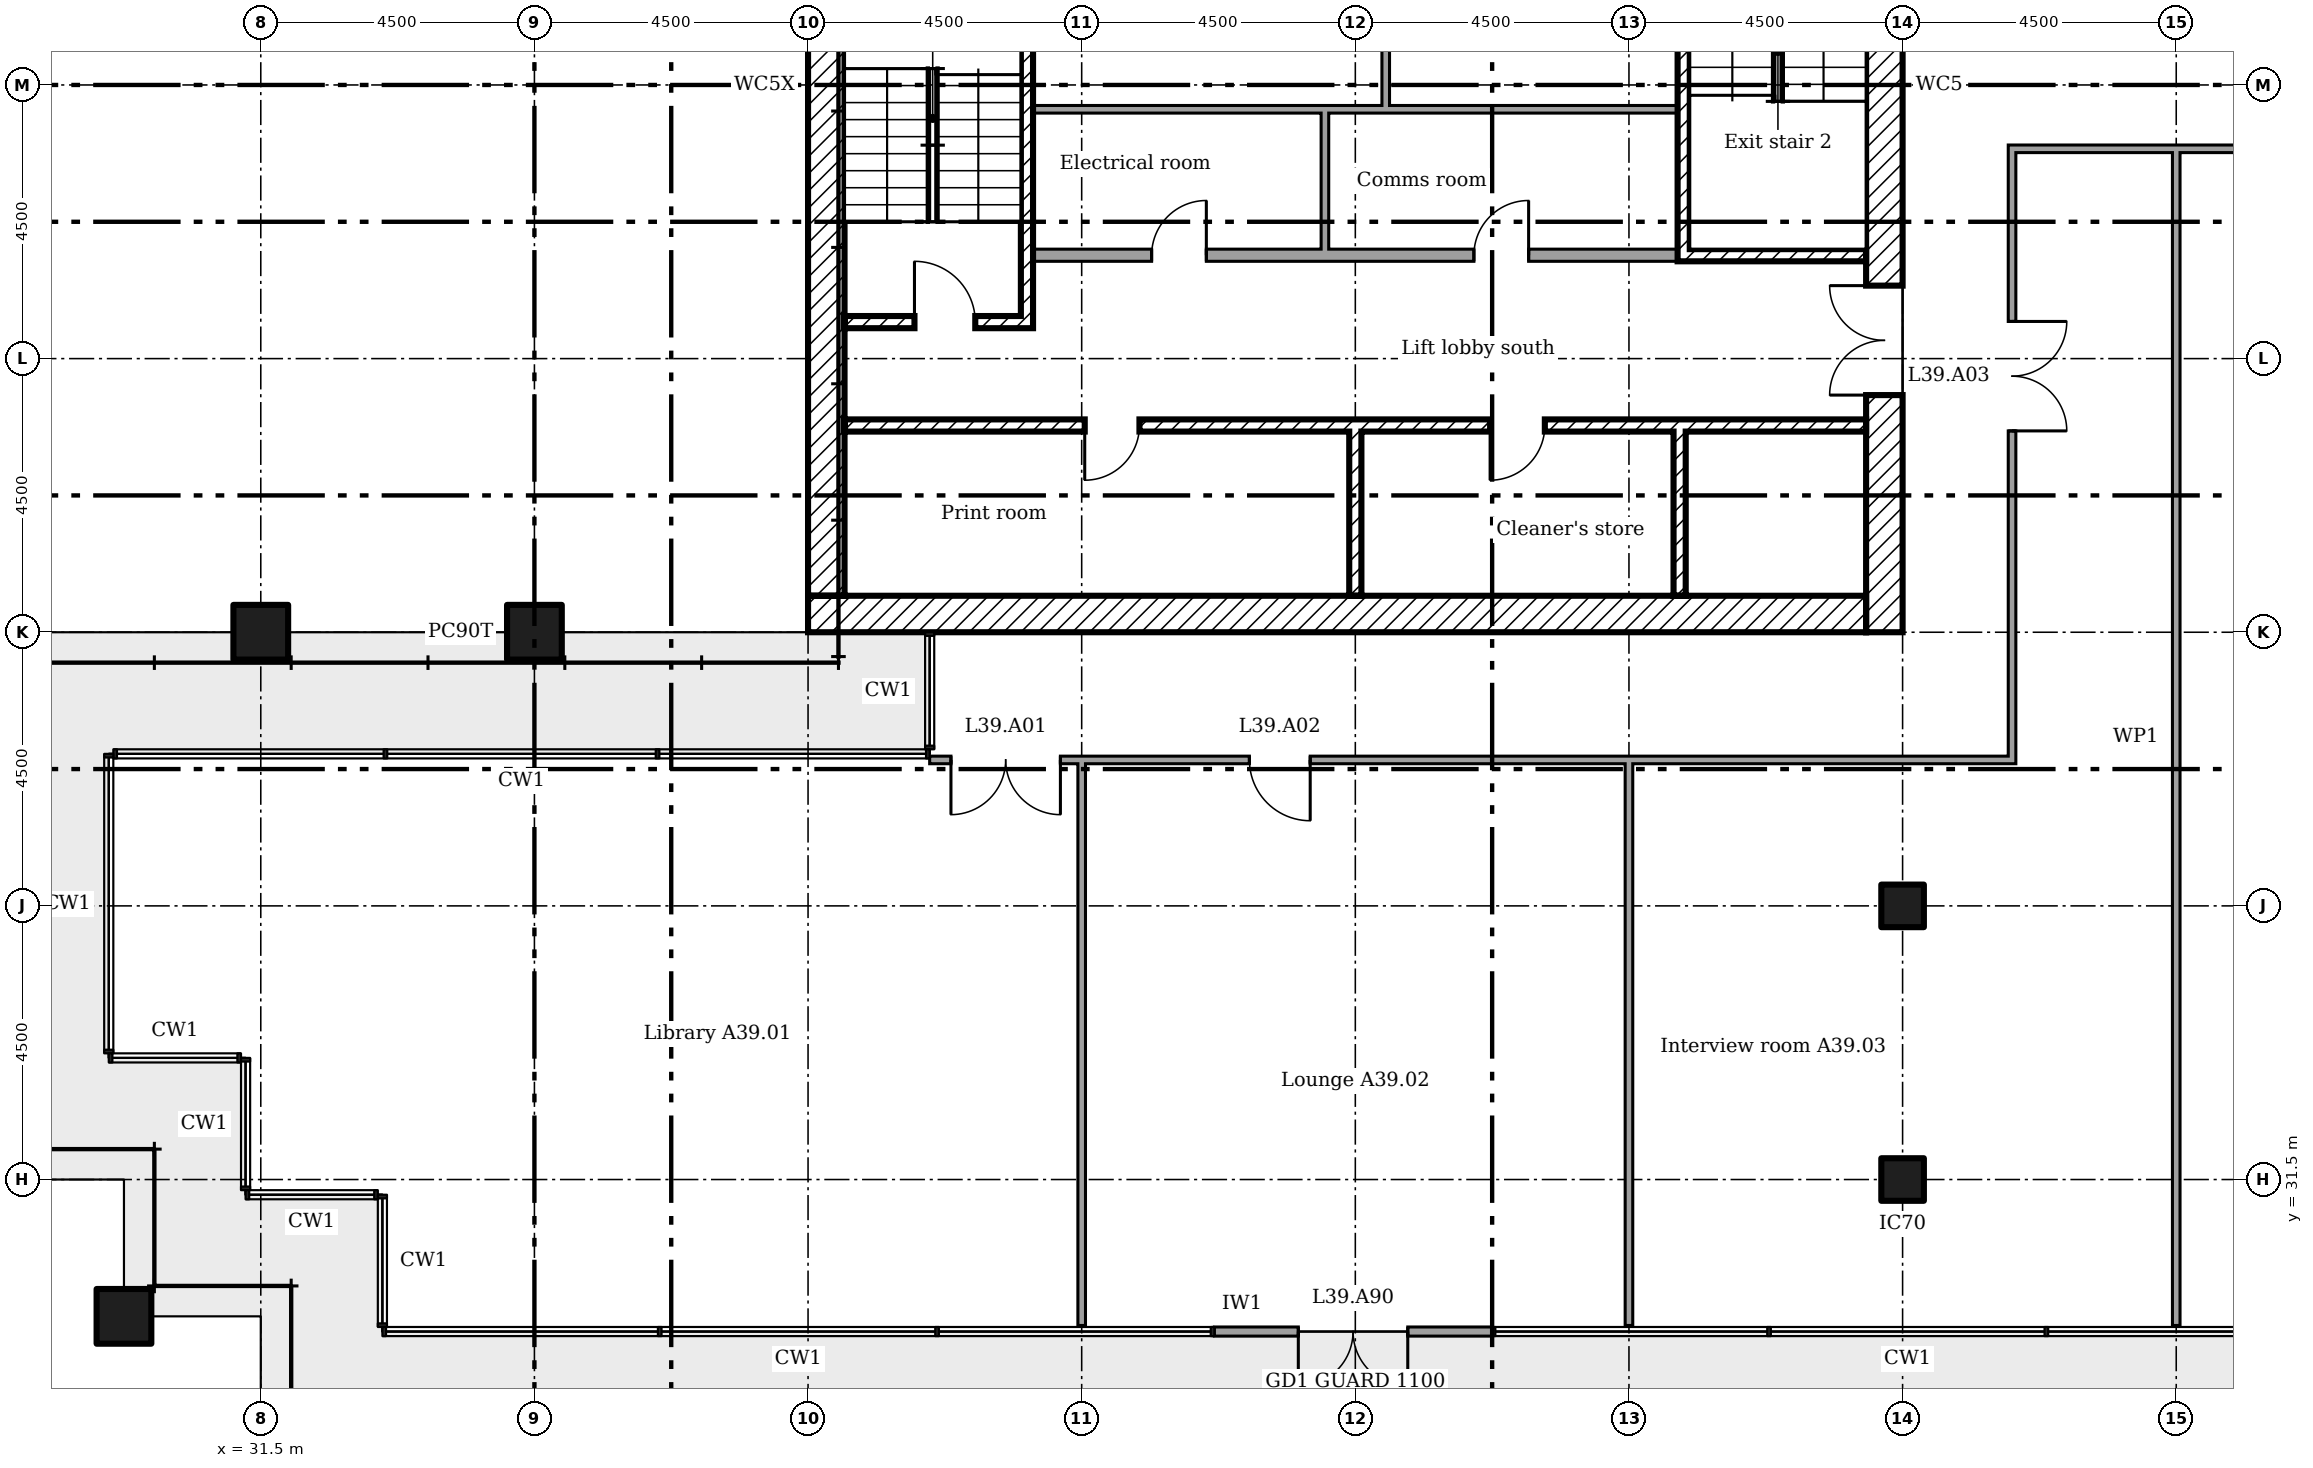
"""IFC4 building model, lengths in metres.
Left out: names, types, materials, properties, quantities, classifications, styles, units other than length and angle.
Written with IfcOpenShell. Run it as: python <this file> out.ifc"""

import sys

from ifc_helpers import new_model, si_unit, direction, frame, frame_2d, origin, origin_2d, place, context, subcontext, project, spatial, rectangle, extrude, element, fill, save


model = new_model("IFC4")
c1 = context("Model", 3, precision=1e-05, world=origin(), true_north=direction((0.0, 1.0)))
c2 = subcontext(c1, "Body", "Model", "MODEL_VIEW")
j1 = project(units=[si_unit("LENGTHUNIT", "METRE"), si_unit("PLANEANGLEUNIT", "RADIAN")], contexts=[c1])
p1 = place(None, origin())
s1 = spatial("IfcSite", under=j1, at=p1, CompositionType="ELEMENT")
p2 = place(p1, origin())
s2 = spatial("IfcBuilding", under=s1, at=p2, CompositionType="ELEMENT")
p3 = place(p2, frame((0.0, 0.0, 158.2)))
s3 = spatial("IfcBuildingStorey", under=s2, at=p3, CompositionType="ELEMENT", Elevation=158.2)
for number, where in (
    (1, (36.0, 40.5, 0.0)),
    (2, (31.5, 40.5, 0.0)),
    (3, (29.25, 29.25, 0.0)),
):
    element("IfcColumn", number, at=place(p3, frame(where)), inside=s3, PredefinedType="COLUMN", context=c2, shape_type="SweptSolid", body=[
        extrude(rectangle(XDim=0.9, YDim=0.9, at=origin_2d()), origin(), (0.0, 0.0, 1.0), 3.6),
    ])
for number, where in (
    (4, (58.5, 31.5, 0.0)),
    (5, (58.5, 36.0, 0.0)),
):
    element("IfcColumn", number, at=place(p3, frame(where)), inside=s3, PredefinedType="COLUMN", context=c2, shape_type="SweptSolid", body=[
        extrude(rectangle(XDim=0.7, YDim=0.7, at=origin_2d()), origin(), (0.0, 0.0, 1.0), 3.6),
    ])
p4 = place(p3, frame((47.182, 29.0, 0.0)))
e6 = element("IfcWall", 6, at=p4, inside=s3, PredefinedType="SOLIDWALL", context=c2, shape_type="SweptSolid", body=[
    extrude(rectangle(XDim=4.561, YDim=0.15, at=frame_2d((2.28, 0.0))), origin(), (0.0, 0.0, 1.0), 3.45),
])
p5 = place(p4, frame((1.38, 0.0, 0.0)))
e7 = element("IfcOpeningElement", 7, at=p5, cuts=e6, PredefinedType="OPENING", context=c2, shape_type="SweptSolid", body=[
    extrude(rectangle(XDim=1.8, YDim=2.4, at=frame_2d((0.9, 1.2))), frame((0.0, 0.085, 0.0), z_axis=(0.0, -1.0, 0.0), x_axis=(1.0, 0.0, 0.0)), (0.0, 0.0, 1.0), 0.17),
])
p6 = place(p3, frame((58.2, 40.5, 0.0), z_axis=(0.0, 0.0, 1.0), x_axis=(0.0, 1.0, 0.0)))
e8 = element("IfcWall", 8, at=p6, inside=s3, PredefinedType="SHEAR", context=c2, shape_type="SweptSolid", body=[
    extrude(rectangle(XDim=18.0, YDim=0.6, at=frame_2d((9.0, 0.0))), origin(), (0.0, 0.0, 1.0), 3.35),
])
p7 = place(p6, frame((13.15, 0.0, 0.0)))
e9 = element("IfcOpeningElement", 9, at=p7, cuts=e8, PredefinedType="OPENING", context=c2, shape_type="SweptSolid", body=[
    extrude(rectangle(XDim=1.2, YDim=2.1, at=frame_2d((0.6, 1.05))), frame((0.0, 0.31, 0.0), z_axis=(0.0, -1.0, 0.0), x_axis=(1.0, 0.0, 0.0)), (0.0, 0.0, 1.0), 0.62),
])
p8 = place(p6, frame((3.9, 0.0, 0.0)))
e10 = element("IfcOpeningElement", 10, at=p8, cuts=e8, PredefinedType="OPENING", context=c2, shape_type="SweptSolid", body=[
    extrude(rectangle(XDim=1.8, YDim=2.1, at=frame_2d((0.9, 1.05))), frame((0.0, 0.31, 0.0), z_axis=(0.0, -1.0, 0.0), x_axis=(1.0, 0.0, 0.0)), (0.0, 0.0, 1.0), 0.62),
])
p9 = place(p6, frame((11.525, 0.0, 0.0)))
e11 = element("IfcOpeningElement", 11, at=p9, cuts=e8, PredefinedType="OPENING", context=c2, shape_type="SweptSolid", body=[
    extrude(rectangle(XDim=1.0, YDim=2.1, at=frame_2d((0.5, 1.05))), frame((0.0, 0.31, 0.0), z_axis=(0.0, -1.0, 0.0), x_axis=(1.0, 0.0, 0.0)), (0.0, 0.0, 1.0), 0.62),
])
p10 = place(p3, frame((40.5, 40.8, 0.0)))
e12 = element("IfcWall", 12, at=p10, inside=s3, PredefinedType="SHEAR", context=c2, shape_type="SweptSolid", body=[
    extrude(rectangle(XDim=17.4, YDim=0.6, at=frame_2d((8.7, 0.0))), origin(), (0.0, 0.0, 1.0), 3.35),
])
p11 = place(p3, frame((40.8, 41.1, 0.0), z_axis=(0.0, 0.0, 1.0), x_axis=(0.0, 1.0, 0.0)))
e13 = element("IfcWall", 13, at=p11, inside=s3, PredefinedType="SHEAR", context=c2, shape_type="SweptSolid", body=[
    extrude(rectangle(XDim=16.8, YDim=0.6, at=frame_2d((8.4, 0.0))), origin(), (0.0, 0.0, 1.0), 3.35),
])
for number, where, z_axis, x_axis in (
    (14, (49.5, 41.1, 0.0), (0.0, 0.0, 1.0), (0.0, 1.0, 0.0)),
    (15, (54.833, 41.1, 0.0), (0.0, 0.0, 1.0), (0.0, 1.0, 0.0)),
):
    element("IfcWall", number, at=place(p3, frame(where, z_axis=z_axis, x_axis=x_axis)), inside=s3, PredefinedType="SHEAR", context=c2, shape_type="SweptSolid", body=[
        extrude(rectangle(XDim=2.7, YDim=0.2, at=frame_2d((1.35, 0.0))), origin(), (0.0, 0.0, 1.0), 3.35),
    ])
p12 = place(p3, frame((41.1, 43.9, 0.0)))
e16 = element("IfcWall", 16, at=p12, inside=s3, PredefinedType="SHEAR", context=c2, shape_type="SweptSolid", body=[
    extrude(rectangle(XDim=16.8, YDim=0.2, at=frame_2d((8.4, 0.0))), origin(), (0.0, 0.0, 1.0), 3.35),
])
p13 = place(p12, frame((3.95, 0.0, 0.0)))
e17 = element("IfcOpeningElement", 17, at=p13, cuts=e16, PredefinedType="OPENING", context=c2, shape_type="SweptSolid", body=[
    extrude(rectangle(XDim=0.9, YDim=2.1, at=frame_2d((0.45, 1.05))), frame((0.0, 0.11, 0.0), z_axis=(0.0, -1.0, 0.0), x_axis=(1.0, 0.0, 0.0)), (0.0, 0.0, 1.0), 0.22),
])
p14 = place(p12, frame((10.617, 0.0, 0.0)))
e18 = element("IfcOpeningElement", 18, at=p14, cuts=e16, PredefinedType="OPENING", context=c2, shape_type="SweptSolid", body=[
    extrude(rectangle(XDim=0.9, YDim=2.1, at=frame_2d((0.45, 1.05))), frame((0.0, 0.11, 0.0), z_axis=(0.0, -1.0, 0.0), x_axis=(1.0, 0.0, 0.0)), (0.0, 0.0, 1.0), 0.22),
])
p15 = place(p3, frame((44.1, 45.5, 0.0), z_axis=(0.0, 0.0, 1.0), x_axis=(0.0, 1.0, 0.0)))
e19 = element("IfcWall", 19, at=p15, inside=s3, PredefinedType="SHEAR", context=c2, shape_type="SweptSolid", body=[
    extrude(rectangle(XDim=6.9, YDim=0.2, at=frame_2d((3.45, 0.0))), origin(), (0.0, 0.0, 1.0), 3.35),
])
p16 = place(p3, frame((41.1, 45.6, 0.0)))
e20 = element("IfcWall", 20, at=p16, inside=s3, PredefinedType="SHEAR", context=c2, shape_type="SweptSolid", body=[
    extrude(rectangle(XDim=2.9, YDim=0.2, at=frame_2d((1.45, 0.0))), origin(), (0.0, 0.0, 1.0), 3.35),
])
p17 = place(p16, frame((1.15, 0.0, 0.0)))
e21 = element("IfcOpeningElement", 21, at=p17, cuts=e20, PredefinedType="OPENING", context=c2, shape_type="SweptSolid", body=[
    extrude(rectangle(XDim=1.0, YDim=2.1, at=frame_2d((0.5, 1.05))), frame((0.0, 0.11, 0.0), z_axis=(0.0, -1.0, 0.0), x_axis=(1.0, 0.0, 0.0)), (0.0, 0.0, 1.0), 0.22),
])
p18 = place(p3, frame((54.8, 46.7, 0.0)))
e22 = element("IfcWall", 22, at=p18, inside=s3, PredefinedType="SHEAR", context=c2, shape_type="SweptSolid", body=[
    extrude(rectangle(XDim=3.1, YDim=0.2, at=frame_2d((1.55, 0.0))), origin(), (0.0, 0.0, 1.0), 3.35),
])
p19 = place(p3, frame((54.9, 46.8, 0.0), z_axis=(0.0, 0.0, 1.0), x_axis=(0.0, 1.0, 0.0)))
e23 = element("IfcWall", 23, at=p19, inside=s3, PredefinedType="SHEAR", context=c2, shape_type="SweptSolid", body=[
    extrude(rectangle(XDim=6.5, YDim=0.2, at=frame_2d((3.25, 0.0))), origin(), (0.0, 0.0, 1.0), 3.35),
])
p20 = place(p3, frame((44.2, 46.7, 0.0)))
e24 = element("IfcWall", 24, at=p20, inside=s3, PredefinedType="PARTITIONING", context=c2, shape_type="SweptSolid", body=[
    extrude(rectangle(XDim=10.6, YDim=0.2, at=frame_2d((5.3, 0.0))), origin(), (0.0, 0.0, 1.0), 3.35),
])
p21 = place(p20, frame((1.95, 0.0, 0.0)))
e25 = element("IfcOpeningElement", 25, at=p21, cuts=e24, PredefinedType="OPENING", context=c2, shape_type="SweptSolid", body=[
    extrude(rectangle(XDim=0.9, YDim=2.1, at=frame_2d((0.45, 1.05))), frame((0.0, 0.11, 0.0), z_axis=(0.0, -1.0, 0.0), x_axis=(1.0, 0.0, 0.0)), (0.0, 0.0, 1.0), 0.22),
])
p22 = place(p20, frame((7.25, 0.0, 0.0)))
e26 = element("IfcOpeningElement", 26, at=p22, cuts=e24, PredefinedType="OPENING", context=c2, shape_type="SweptSolid", body=[
    extrude(rectangle(XDim=0.9, YDim=2.1, at=frame_2d((0.45, 1.05))), frame((0.0, 0.11, 0.0), z_axis=(0.0, -1.0, 0.0), x_axis=(1.0, 0.0, 0.0)), (0.0, 0.0, 1.0), 0.22),
])
p23 = place(p3, frame((49.0, 46.8, 0.0), z_axis=(0.0, 0.0, 1.0), x_axis=(0.0, 1.0, 0.0)))
e27 = element("IfcWall", 27, at=p23, inside=s3, PredefinedType="PARTITIONING", context=c2, shape_type="SweptSolid", body=[
    extrude(rectangle(XDim=2.363, YDim=0.125, at=frame_2d((1.181, 0.0))), origin(), (0.0, 0.0, 1.0), 3.35),
])
p24 = place(p3, frame((49.0, 49.1, 0.0), z_axis=(0.0, 0.0, 1.0), x_axis=(-1.0, 0.0, 0.0)))
e28 = element("IfcWall", 28, at=p24, inside=s3, PredefinedType="PARTITIONING", context=c2, shape_type="SweptSolid", body=[
    extrude(rectangle(XDim=4.8, YDim=0.125, at=frame_2d((2.4, 0.0))), origin(), (0.0, 0.0, 1.0), 3.35),
])
p25 = place(p3, frame((50.062, 49.1, 0.0), z_axis=(0.0, 0.0, 1.0), x_axis=(-1.0, 0.0, 0.0)))
e29 = element("IfcWall", 29, at=p25, inside=s3, PredefinedType="PARTITIONING", context=c2, shape_type="SweptSolid", body=[
    extrude(rectangle(XDim=1.0, YDim=0.125, at=frame_2d((0.5, 0.0))), origin(), (0.0, 0.0, 1.0), 3.35),
])
p26 = place(p3, frame((54.8, 49.1, 0.0), z_axis=(0.0, 0.0, 1.0), x_axis=(-1.0, 0.0, 0.0)))
e30 = element("IfcWall", 30, at=p26, inside=s3, PredefinedType="PARTITIONING", context=c2, shape_type="SweptSolid", body=[
    extrude(rectangle(XDim=4.8, YDim=0.125, at=frame_2d((2.4, 0.0))), origin(), (0.0, 0.0, 1.0), 3.35),
])
p27 = place(p3, frame((50.0, 49.163, 0.0), z_axis=(0.0, 0.0, 1.0), x_axis=(0.0, 1.0, 0.0)))
e31 = element("IfcWall", 31, at=p27, inside=s3, PredefinedType="PARTITIONING", context=c2, shape_type="SweptSolid", body=[
    extrude(rectangle(XDim=2.637, YDim=0.125, at=frame_2d((1.319, 0.0))), origin(), (0.0, 0.0, 1.0), 3.35),
])
p28 = place(p3, frame((42.5, 38.4, 0.0)))
e32 = element("IfcWall", 32, at=p28, inside=s3, PredefinedType="PARTITIONING", context=c2, shape_type="SweptSolid", body=[
    extrude(rectangle(XDim=17.863, YDim=0.125, at=frame_2d((8.931, 0.0))), origin(), (0.0, 0.0, 1.0), 3.45),
])
p29 = place(p28, frame((0.35, 0.0, 0.0)))
e33 = element("IfcOpeningElement", 33, at=p29, cuts=e32, PredefinedType="OPENING", context=c2, shape_type="SweptSolid", body=[
    extrude(rectangle(XDim=1.8, YDim=2.1, at=frame_2d((0.9, 1.05))), frame((0.0, 0.073, 0.0), z_axis=(0.0, -1.0, 0.0), x_axis=(1.0, 0.0, 0.0)), (0.0, 0.0, 1.0), 0.145),
])
p30 = place(p28, frame((5.258, 0.0, 0.0)))
e34 = element("IfcOpeningElement", 34, at=p30, cuts=e32, PredefinedType="OPENING", context=c2, shape_type="SweptSolid", body=[
    extrude(rectangle(XDim=1.0, YDim=2.1, at=frame_2d((0.5, 1.05))), frame((0.0, 0.073, 0.0), z_axis=(0.0, -1.0, 0.0), x_axis=(1.0, 0.0, 0.0)), (0.0, 0.0, 1.0), 0.145),
])
p31 = place(p3, frame((60.238, 48.45, 0.0)))
e35 = element("IfcWall", 35, at=p31, inside=s3, PredefinedType="PARTITIONING", context=c2, shape_type="SweptSolid", body=[
    extrude(rectangle(XDim=9.662, YDim=0.125, at=frame_2d((4.831, 0.0))), origin(), (0.0, 0.0, 1.0), 3.45),
])
p32 = place(p31, frame((5.312, 0.0, 0.0)))
e36 = element("IfcOpeningElement", 36, at=p32, cuts=e35, PredefinedType="OPENING", context=c2, shape_type="SweptSolid", body=[
    extrude(rectangle(XDim=1.8, YDim=2.1, at=frame_2d((0.9, 1.05))), frame((0.0, 0.073, 0.0), z_axis=(0.0, -1.0, 0.0), x_axis=(1.0, 0.0, 0.0)), (0.0, 0.0, 1.0), 0.145),
])
for number, where, z_axis, x_axis in (
    (37, (45.0, 29.1, 0.0), (0.0, 0.0, 1.0), (0.0, 1.0, 0.0)),
    (38, (54.0, 29.1, 0.0), (0.0, 0.0, 1.0), (0.0, 1.0, 0.0)),
):
    element("IfcWall", number, at=place(p3, frame(where, z_axis=z_axis, x_axis=x_axis)), inside=s3, PredefinedType="PARTITIONING", context=c2, shape_type="SweptSolid", body=[
        extrude(rectangle(XDim=9.3, YDim=0.125, at=frame_2d((4.65, 0.0))), origin(), (0.0, 0.0, 1.0), 2.766),
    ])
p33 = place(p3, frame((60.3, 38.462, 0.0), z_axis=(0.0, 0.0, 1.0), x_axis=(0.0, 1.0, 0.0)))
e39 = element("IfcWall", 39, at=p33, inside=s3, PredefinedType="PARTITIONING", context=c2, shape_type="SweptSolid", body=[
    extrude(rectangle(XDim=9.925, YDim=0.125, at=frame_2d((4.962, 0.0))), origin(), (0.0, 0.0, 1.0), 3.45),
])
p34 = place(p33, frame((5.348, 0.0, 0.0)))
e40 = element("IfcOpeningElement", 40, at=p34, cuts=e39, PredefinedType="OPENING", context=c2, shape_type="SweptSolid", body=[
    extrude(rectangle(XDim=1.8, YDim=2.1, at=frame_2d((0.9, 1.05))), frame((0.0, 0.073, 0.0), z_axis=(0.0, -1.0, 0.0), x_axis=(1.0, 0.0, 0.0)), (0.0, 0.0, 1.0), 0.145),
])
p35 = place(p3, frame((63.0, 29.1, 0.0), z_axis=(0.0, 0.0, 1.0), x_axis=(0.0, 1.0, 0.0)))
e41 = element("IfcWall", 41, at=p35, inside=s3, PredefinedType="PARTITIONING", context=c2, shape_type="SweptSolid", body=[
    extrude(rectangle(XDim=19.35, YDim=0.125, at=frame_2d((9.675, 0.0))), origin(), (0.0, 0.0, 1.0), 3.45),
])
p36 = place(p5, frame((1.8, 0.0, 0.0), x_axis=(-1.0, 0.0, 0.0)))
e42 = element("IfcDoor", 42, at=p36, inside=s3, OperationType="DOUBLE_DOOR_DOUBLE_SWING", PredefinedType="NOTDEFINED", context=c2, shape_type="SweptSolid", body=[
    extrude(rectangle(XDim=1.8, YDim=2.4, at=frame_2d((0.9, 1.2))), frame((0.0, 0.025, 0.0), z_axis=(0.0, -1.0, 0.0), x_axis=(1.0, 0.0, 0.0)), (0.0, 0.0, 1.0), 0.05),
])
fill(e7, e42)
p37 = place(p8, origin())
e43 = element("IfcDoor", 43, at=p37, inside=s3, OperationType="DOUBLE_DOOR_SINGLE_SWING", PredefinedType="DOOR", context=c2, shape_type="SweptSolid", body=[
    extrude(rectangle(XDim=1.8, YDim=2.1, at=frame_2d((0.9, 1.05))), frame((0.0, 0.025, 0.0), z_axis=(0.0, -1.0, 0.0), x_axis=(1.0, 0.0, 0.0)), (0.0, 0.0, 1.0), 0.05),
])
fill(e10, e43)
p38 = place(p17, origin())
e44 = element("IfcDoor", 44, at=p38, inside=s3, OperationType="SINGLE_SWING_RIGHT", PredefinedType="DOOR", context=c2, shape_type="SweptSolid", body=[
    extrude(rectangle(XDim=1.0, YDim=2.1, at=frame_2d((0.5, 1.05))), frame((0.0, 0.025, 0.0), z_axis=(0.0, -1.0, 0.0), x_axis=(1.0, 0.0, 0.0)), (0.0, 0.0, 1.0), 0.05),
])
fill(e21, e44)
p39 = place(p13, frame((0.9, 0.0, 0.0), x_axis=(-1.0, 0.0, 0.0)))
e45 = element("IfcDoor", 45, at=p39, inside=s3, OperationType="SINGLE_SWING_LEFT", PredefinedType="DOOR", context=c2, shape_type="SweptSolid", body=[
    extrude(rectangle(XDim=0.9, YDim=2.1, at=frame_2d((0.45, 1.05))), frame((0.0, 0.025, 0.0), z_axis=(0.0, -1.0, 0.0), x_axis=(1.0, 0.0, 0.0)), (0.0, 0.0, 1.0), 0.05),
])
fill(e17, e45)
p40 = place(p14, frame((0.9, 0.0, 0.0), x_axis=(-1.0, 0.0, 0.0)))
e46 = element("IfcDoor", 46, at=p40, inside=s3, OperationType="SINGLE_SWING_LEFT", PredefinedType="DOOR", context=c2, shape_type="SweptSolid", body=[
    extrude(rectangle(XDim=0.9, YDim=2.1, at=frame_2d((0.45, 1.05))), frame((0.0, 0.025, 0.0), z_axis=(0.0, -1.0, 0.0), x_axis=(1.0, 0.0, 0.0)), (0.0, 0.0, 1.0), 0.05),
])
fill(e18, e46)
p41 = place(p21, origin())
e47 = element("IfcDoor", 47, at=p41, inside=s3, OperationType="SINGLE_SWING_LEFT", PredefinedType="DOOR", context=c2, shape_type="SweptSolid", body=[
    extrude(rectangle(XDim=0.9, YDim=2.1, at=frame_2d((0.45, 1.05))), frame((0.0, 0.025, 0.0), z_axis=(0.0, -1.0, 0.0), x_axis=(1.0, 0.0, 0.0)), (0.0, 0.0, 1.0), 0.05),
])
fill(e25, e47)
p42 = place(p22, origin())
e48 = element("IfcDoor", 48, at=p42, inside=s3, OperationType="SINGLE_SWING_LEFT", PredefinedType="DOOR", context=c2, shape_type="SweptSolid", body=[
    extrude(rectangle(XDim=0.9, YDim=2.1, at=frame_2d((0.45, 1.05))), frame((0.0, 0.025, 0.0), z_axis=(0.0, -1.0, 0.0), x_axis=(1.0, 0.0, 0.0)), (0.0, 0.0, 1.0), 0.05),
])
fill(e26, e48)
p43 = place(p29, frame((1.8, 0.0, 0.0), x_axis=(-1.0, 0.0, 0.0)))
e49 = element("IfcDoor", 49, at=p43, inside=s3, OperationType="DOUBLE_DOOR_SINGLE_SWING", PredefinedType="DOOR", context=c2, shape_type="SweptSolid", body=[
    extrude(rectangle(XDim=1.8, YDim=2.1, at=frame_2d((0.9, 1.05))), frame((0.0, 0.025, 0.0), z_axis=(0.0, -1.0, 0.0), x_axis=(1.0, 0.0, 0.0)), (0.0, 0.0, 1.0), 0.05),
])
fill(e33, e49)
p44 = place(p30, frame((1.0, 0.0, 0.0), x_axis=(-1.0, 0.0, 0.0)))
e50 = element("IfcDoor", 50, at=p44, inside=s3, OperationType="SINGLE_SWING_RIGHT", PredefinedType="DOOR", context=c2, shape_type="SweptSolid", body=[
    extrude(rectangle(XDim=1.0, YDim=2.1, at=frame_2d((0.5, 1.05))), frame((0.0, 0.025, 0.0), z_axis=(0.0, -1.0, 0.0), x_axis=(1.0, 0.0, 0.0)), (0.0, 0.0, 1.0), 0.05),
])
fill(e34, e50)
p45 = place(p34, frame((1.8, 0.0, 0.0), x_axis=(-1.0, 0.0, 0.0)))
e51 = element("IfcDoor", 51, at=p45, inside=s3, OperationType="DOUBLE_DOOR_SINGLE_SWING", PredefinedType="DOOR", context=c2, shape_type="SweptSolid", body=[
    extrude(rectangle(XDim=1.8, YDim=2.1, at=frame_2d((0.9, 1.05))), frame((0.0, 0.025, 0.0), z_axis=(0.0, -1.0, 0.0), x_axis=(1.0, 0.0, 0.0)), (0.0, 0.0, 1.0), 0.05),
])
fill(e40, e51)
save(model, sys.argv[1])
